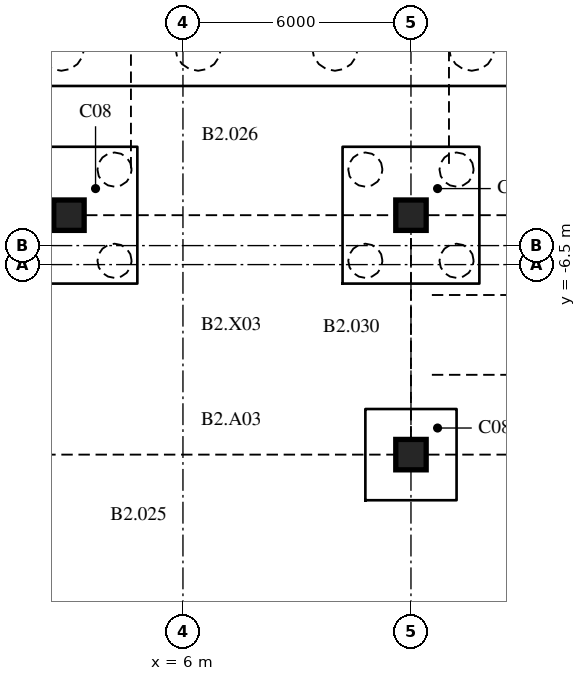
"""IFC4 building model, lengths in metres.
Left out: names, types, materials, properties, quantities, classifications, styles, units other than length and angle.
Written with IfcOpenShell. Run it as: python <this file> out.ifc"""

import sys

from ifc_helpers import new_model, si_unit, direction, frame, origin, origin_2d, place, context, subcontext, project, spatial, rectangle, extrude, element, save


model = new_model("IFC4")
c1 = context("Model", 3, precision=1e-05, world=origin(), true_north=direction((0.0, 1.0)))
c2 = subcontext(c1, "Body", "Model", "MODEL_VIEW")
j1 = project(units=[si_unit("LENGTHUNIT", "METRE"), si_unit("PLANEANGLEUNIT", "RADIAN")], contexts=[c1])
p1 = place(None, origin())
s1 = spatial("IfcSite", under=j1, at=p1, CompositionType="ELEMENT")
p2 = place(p1, origin())
s2 = spatial("IfcBuilding", under=s1, at=p2, CompositionType="ELEMENT")
p3 = place(p2, frame((0.0, 0.0, -7.5)))
s3 = spatial("IfcBuildingStorey", under=s2, at=p3, CompositionType="ELEMENT", Elevation=-7.5)
for number, where, z_axis, x_axis in (
    (1, (3.0, -5.2, -0.6), (0.0, 0.0, 1.0), (1.0, 0.0, 0.0)),
    (2, (12.0, -5.2, -0.6), (0.0, 0.0, 1.0), (1.0, 0.0, 0.0)),
    (3, (12.0, -11.5, -0.6), (0.0, 0.0, 1.0), (1.0, 0.0, 0.0)),
):
    element("IfcColumn", number, at=place(p3, frame(where, z_axis=z_axis, x_axis=x_axis)), inside=s3, PredefinedType="COLUMN", context=c2, shape_type="SweptSolid", body=[
        extrude(rectangle(XDim=0.8, YDim=0.8, at=origin_2d()), origin(), (0.0, 0.0, 1.0), 4.1),
    ])
save(model, sys.argv[1])
